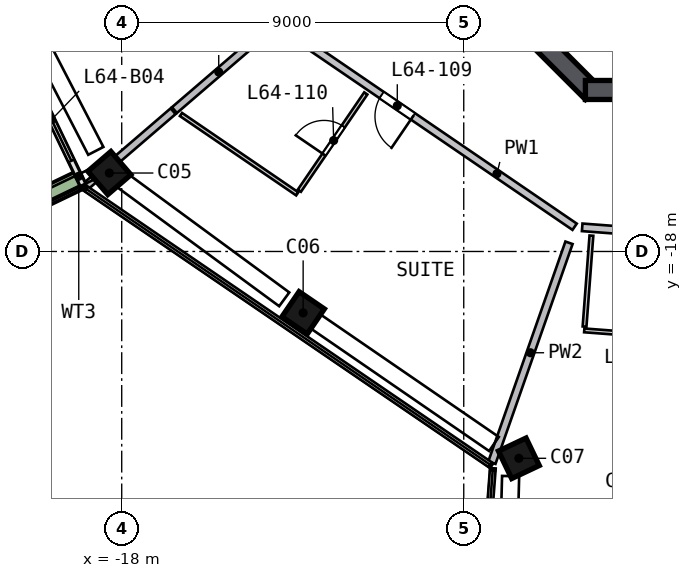
"""IFC4 building model, lengths in metres.
Left out: names, types, materials, properties, quantities, classifications, styles, units other than length and angle.
Written with IfcOpenShell. Run it as: python <this file> out.ifc"""

import sys

from ifc_helpers import new_model, si_unit, direction, frame, frame_2d, origin, origin_2d, place, context, subcontext, project, spatial, rectangle, extrude, element, fill, save


model = new_model("IFC4")
c1 = context("Model", 3, precision=1e-05, world=origin(), true_north=direction((0.0, 1.0)))
c2 = subcontext(c1, "Body", "Model", "MODEL_VIEW")
j1 = project(units=[si_unit("LENGTHUNIT", "METRE"), si_unit("PLANEANGLEUNIT", "RADIAN")], contexts=[c1])
p1 = place(None, origin())
s1 = spatial("IfcSite", under=j1, at=p1, CompositionType="ELEMENT")
p2 = place(p1, origin())
s2 = spatial("IfcBuilding", under=s1, at=p2, CompositionType="ELEMENT")
p3 = place(p2, frame((0.0, 0.0, 259.5)))
s3 = spatial("IfcBuildingStorey", under=s2, at=p3, CompositionType="ELEMENT", Elevation=259.5)
p4 = place(p3, frame((-18.417, -15.83, 0.0), z_axis=(0.075985477, -0.086979121, 0.993308029), x_axis=(-0.647132727, 0.75357881, 0.115491175)))
e1 = element("IfcColumn", 1, at=p4, inside=s3, PredefinedType="COLUMN", context=c2, shape_type="SweptSolid", body=[
    extrude(rectangle(XDim=0.8, YDim=0.8, at=origin_2d()), origin(), (0.0, 0.0, 1.0), 3.02),
])
p5 = place(p3, frame((-13.339, -19.54, 0.0), z_axis=(0.093477865, -0.062668984, 0.993647064), x_axis=(0.820609145, -0.560299936, -0.11253716)))
e2 = element("IfcColumn", 2, at=p5, inside=s3, PredefinedType="COLUMN", context=c2, shape_type="SweptSolid", body=[
    extrude(rectangle(XDim=0.8, YDim=0.8, at=origin_2d()), origin(), (0.0, 0.0, 1.0), 3.019),
])
p6 = place(p3, frame((-7.684, -23.4, 0.0), z_axis=(0.111532516, -0.035561092, 0.993124316), x_axis=(-0.426004708, 0.901167169, 0.080110681)))
e3 = element("IfcColumn", 3, at=p6, inside=s3, PredefinedType="COLUMN", context=c2, shape_type="SweptSolid", body=[
    extrude(rectangle(XDim=0.8, YDim=0.8, at=origin_2d()), origin(), (0.0, 0.0, 1.0), 3.021),
])
p7 = place(p3, frame((-13.823, -5.622, 0.0), z_axis=(0.0, 0.0, 1.0), x_axis=(0.707106781, -0.707106781, 0.0)))
e4 = element("IfcWall", 4, at=p7, inside=s3, PredefinedType="SHEAR", context=c2, shape_type="SweptSolid", body=[
    extrude(rectangle(XDim=11.598, YDim=0.5, at=frame_2d((5.799, 0.0))), origin(), (0.0, 0.0, 1.0), 3.5),
])
p8 = place(p7, frame((2.099, 0.0, 0.0)))
e5 = element("IfcOpeningElement", 5, at=p8, cuts=e4, PredefinedType="OPENING", context=c2, shape_type="SweptSolid", body=[
    extrude(rectangle(XDim=1.2, YDim=2.1, at=frame_2d((0.6, 1.05))), frame((0.0, 0.26, 0.0), z_axis=(0.0, -1.0, 0.0), x_axis=(1.0, 0.0, 0.0)), (0.0, 0.0, 1.0), 0.52),
])
p9 = place(p3, frame((-5.799, -13.75, 0.0), z_axis=(0.0, 0.0, 1.0), x_axis=(1.0, 0.0, 0.0)))
e6 = element("IfcWall", 6, at=p9, inside=s3, PredefinedType="SHEAR", context=c2, shape_type="SweptSolid", body=[
    extrude(rectangle(XDim=11.598, YDim=0.5, at=frame_2d((5.799, 0.0))), origin(), (0.0, 0.0, 1.0), 3.5),
])
p10 = place(p3, frame((-20.54, -13.089, 0.0), z_axis=(0.0, 0.0, 1.0), x_axis=(0.433308583, -0.901245622, 0.0)))
e7 = element("IfcWall", 7, at=p10, inside=s3, PredefinedType="SOLIDWALL", context=c2, shape_type="SweptSolid", body=[
    extrude(rectangle(XDim=3.504, YDim=0.15, at=frame_2d((1.752, 0.0))), origin(), (0.0, 0.0, 1.0), 2.935),
])
p11 = place(p10, frame((0.4, 0.0, 0.0)))
e8 = element("IfcOpeningElement", 8, at=p11, cuts=e7, PredefinedType="OPENING", context=c2, shape_type="SweptSolid", body=[
    extrude(rectangle(XDim=2.4, YDim=2.4, at=frame_2d((1.2, 1.2))), frame((0.0, 0.085, 0.0), z_axis=(0.0, -1.0, 0.0), x_axis=(1.0, 0.0, 0.0)), (0.0, 0.0, 1.0), 0.17),
])
p12 = place(p3, frame((-21.587, -17.315, 0.0), z_axis=(0.0, 0.0, 1.0), x_axis=(0.901213701, 0.433374971, 0.0)))
e9 = element("IfcWall", 9, at=p12, inside=s3, PredefinedType="SOLIDWALL", context=c2, shape_type="SweptSolid", body=[
    extrude(rectangle(XDim=2.699, YDim=0.5, at=frame_2d((1.35, 0.0))), origin(), (0.0, 0.0, 1.0), 0.7),
])
p13 = place(p3, frame((-6.083, -17.349, 0.0), z_axis=(0.0, 0.0, 1.0), x_axis=(-0.825908424, 0.563804288, 0.0)))
e10 = element("IfcWall", 10, at=p13, inside=s3, PredefinedType="SOLIDWALL", context=c2, shape_type="SweptSolid", body=[
    extrude(rectangle(XDim=9.316, YDim=0.2, at=frame_2d((4.658, 0.0))), origin(), (0.0, 0.0, 1.0), 3.0),
])
p14 = place(p13, frame((5.15, 0.0, 0.0)))
e11 = element("IfcOpeningElement", 11, at=p14, cuts=e10, PredefinedType="OPENING", context=c2, shape_type="SweptSolid", body=[
    extrude(rectangle(XDim=1.0, YDim=2.1, at=frame_2d((0.5, 1.05))), frame((0.0, 0.11, 0.0), z_axis=(0.0, -1.0, 0.0), x_axis=(1.0, 0.0, 0.0)), (0.0, 0.0, 1.0), 0.22),
])
p15 = place(p3, frame((-5.883, -17.365, 0.0), z_axis=(0.0, 0.0, 1.0), x_axis=(0.99715902, -0.075325216, 0.0)))
e12 = element("IfcWall", 12, at=p15, inside=s3, PredefinedType="SOLIDWALL", context=c2, shape_type="SweptSolid", body=[
    extrude(rectangle(XDim=3.458, YDim=0.2, at=frame_2d((1.729, 0.0))), origin(), (0.0, 0.0, 1.0), 3.0),
])
p16 = place(p3, frame((-16.648, -14.31, 0.0), z_axis=(0.0, 0.0, 1.0), x_axis=(-0.758397568, -0.651792244, 0.0)))
e13 = element("IfcWall", 13, at=p16, inside=s3, PredefinedType="SOLIDWALL", context=c2, shape_type="SweptSolid", body=[
    extrude(rectangle(XDim=3.011, YDim=0.2, at=frame_2d((1.506, 0.0))), origin(), (0.0, 0.0, 1.0), 3.0),
])
p17 = place(p3, frame((-14.281, -12.275, 0.0), z_axis=(0.0, 0.0, 1.0), x_axis=(-0.758375939, -0.65181741, 0.0)))
e14 = element("IfcWall", 14, at=p17, inside=s3, PredefinedType="SOLIDWALL", context=c2, shape_type="SweptSolid", body=[
    extrude(rectangle(XDim=3.075, YDim=0.2, at=frame_2d((1.537, 0.0))), origin(), (0.0, 0.0, 1.0), 3.0),
])
p18 = place(p3, frame((-6.23, -17.771, 0.0), z_axis=(0.0, 0.0, 1.0), x_axis=(-0.330857589, -0.943680696, 0.0)))
e15 = element("IfcWall", 15, at=p18, inside=s3, PredefinedType="SOLIDWALL", context=c2, shape_type="SweptSolid", body=[
    extrude(rectangle(XDim=6.132, YDim=0.2, at=frame_2d((3.066, 0.0))), origin(), (0.0, 0.0, 1.0), 3.0),
])
p19 = place(p3, frame((-13.382, -16.483, 0.0), z_axis=(0.0, 0.0, 1.0), x_axis=(-0.825895308, 0.563823501, 0.0)))
e16 = element("IfcWall", 16, at=p19, inside=s3, PredefinedType="PARTITIONING", context=c2, shape_type="SweptSolid", body=[
    extrude(rectangle(XDim=3.704, YDim=0.1, at=frame_2d((1.852, 0.0))), origin(), (0.0, 0.0, 1.0), 3.0),
])
p20 = place(p3, frame((-13.325, -16.401, 0.0), z_axis=(0.0, 0.0, 1.0), x_axis=(0.563808375, 0.825905634, 0.0)))
e17 = element("IfcWall", 17, at=p20, inside=s3, PredefinedType="PARTITIONING", context=c2, shape_type="SweptSolid", body=[
    extrude(rectangle(XDim=3.1, YDim=0.1, at=frame_2d((1.55, 0.0))), origin(), (0.0, 0.0, 1.0), 3.0),
])
p21 = place(p20, frame((1.15, 0.0, 0.0)))
e18 = element("IfcOpeningElement", 18, at=p21, cuts=e17, PredefinedType="OPENING", context=c2, shape_type="SweptSolid", body=[
    extrude(rectangle(XDim=0.9, YDim=2.1, at=frame_2d((0.45, 1.05))), frame((0.0, 0.06, 0.0), z_axis=(0.0, -1.0, 0.0), x_axis=(1.0, 0.0, 0.0)), (0.0, 0.0, 1.0), 0.12),
])
p22 = place(p3, frame((-5.821, -19.977, 0.0), z_axis=(0.0, 0.0, 1.0), x_axis=(0.075381725, 0.99715475, 0.0)))
e19 = element("IfcWall", 19, at=p22, inside=s3, PredefinedType="PARTITIONING", context=c2, shape_type="SweptSolid", body=[
    extrude(rectangle(XDim=2.4, YDim=0.1, at=frame_2d((1.2, 0.0))), origin(), (0.0, 0.0, 1.0), 3.0),
])
p23 = place(p3, frame((-5.829, -20.076, 0.0), z_axis=(0.0, 0.0, 1.0), x_axis=(0.997162622, -0.075277518, 0.0)))
e20 = element("IfcWall", 20, at=p23, inside=s3, PredefinedType="PARTITIONING", context=c2, shape_type="SweptSolid", body=[
    extrude(rectangle(XDim=3.0, YDim=0.1, at=frame_2d((1.5, 0.0))), origin(), (0.0, 0.0, 1.0), 3.0),
])
p24 = place(p23, frame((1.15, 0.0, 0.0)))
e21 = element("IfcOpeningElement", 21, at=p24, cuts=e20, PredefinedType="OPENING", context=c2, shape_type="SweptSolid", body=[
    extrude(rectangle(XDim=0.9, YDim=2.1, at=frame_2d((0.45, 1.05))), frame((0.0, 0.06, 0.0), z_axis=(0.0, -1.0, 0.0), x_axis=(1.0, 0.0, 0.0)), (0.0, 0.0, 1.0), 0.12),
])
p25 = place(p11, origin())
e22 = element("IfcDoor", 22, at=p25, inside=s3, OperationType="SLIDING_TO_RIGHT", PredefinedType="DOOR", context=c2, shape_type="SweptSolid", body=[
    extrude(rectangle(XDim=2.4, YDim=2.4, at=frame_2d((1.2, 1.2))), frame((0.0, 0.025, 0.0), z_axis=(0.0, -1.0, 0.0), x_axis=(1.0, 0.0, 0.0)), (0.0, 0.0, 1.0), 0.05),
])
fill(e8, e22)
p26 = place(p14, origin())
e23 = element("IfcDoor", 23, at=p26, inside=s3, OperationType="SINGLE_SWING_LEFT", PredefinedType="DOOR", context=c2, shape_type="SweptSolid", body=[
    extrude(rectangle(XDim=1.0, YDim=2.1, at=frame_2d((0.5, 1.05))), frame((0.0, 0.025, 0.0), z_axis=(0.0, -1.0, 0.0), x_axis=(1.0, 0.0, 0.0)), (0.0, 0.0, 1.0), 0.05),
])
fill(e11, e23)
p27 = place(p21, origin())
e24 = element("IfcDoor", 24, at=p27, inside=s3, OperationType="SINGLE_SWING_LEFT", PredefinedType="DOOR", context=c2, shape_type="SweptSolid", body=[
    extrude(rectangle(XDim=0.9, YDim=2.1, at=frame_2d((0.45, 1.05))), frame((0.0, 0.025, 0.0), z_axis=(0.0, -1.0, 0.0), x_axis=(1.0, 0.0, 0.0)), (0.0, 0.0, 1.0), 0.05),
])
fill(e18, e24)
save(model, sys.argv[1])
